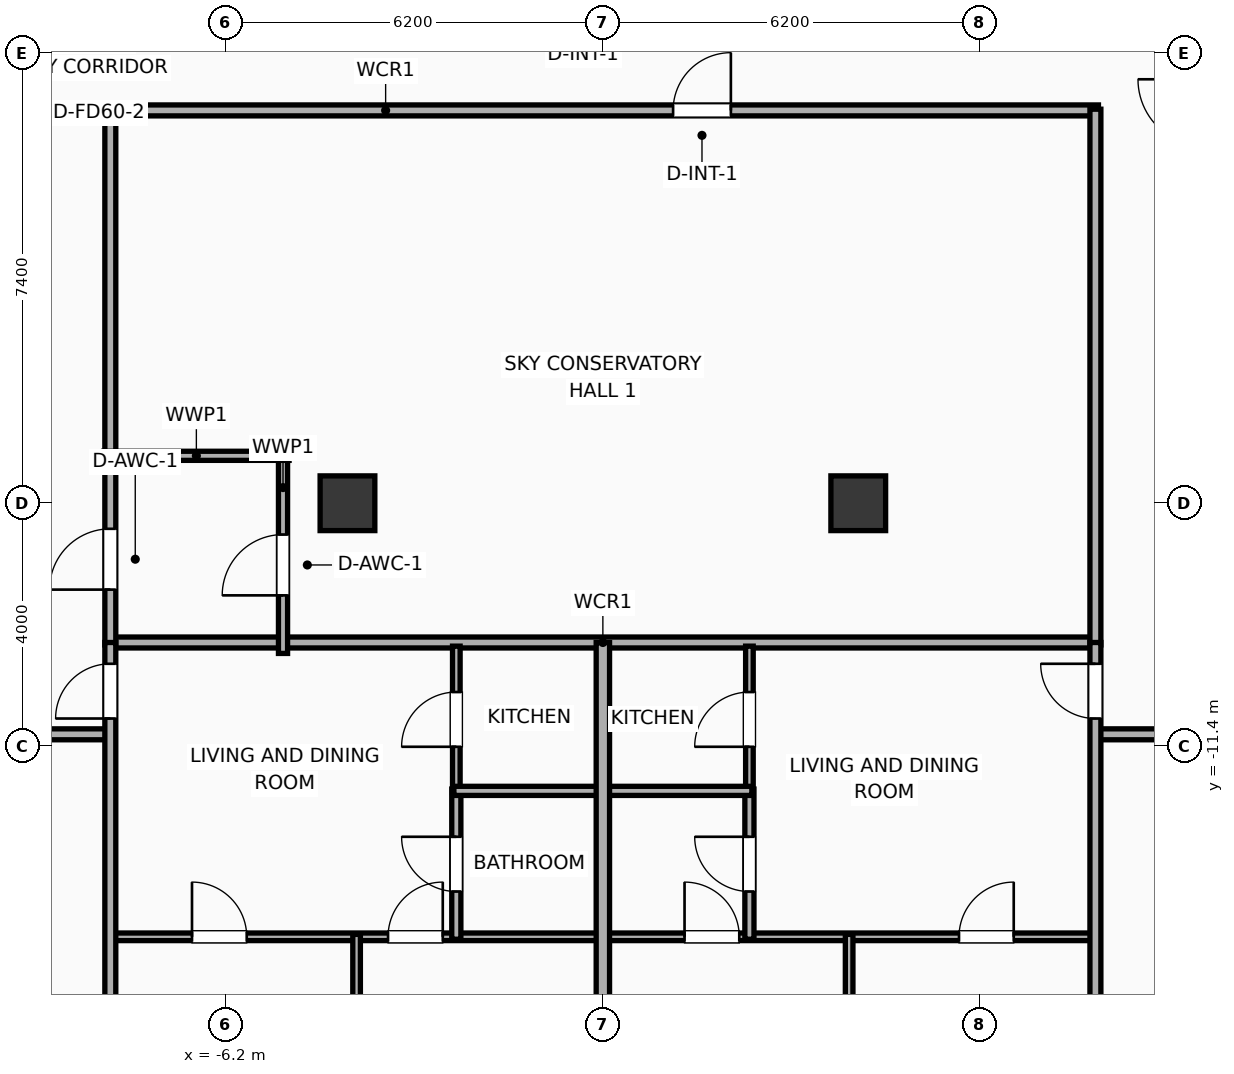
"""IFC4 building model, lengths in metres.
Left out: names, types, materials, properties, quantities, classifications, styles, units other than length and angle.
Written with IfcOpenShell. Run it as: python <this file> out.ifc"""

import sys

from ifc_helpers import new_model, si_unit, direction, frame, frame_2d, origin, origin_2d, place, context, subcontext, project, spatial, rectangle, extrude, element, fill, save


model = new_model("IFC4")
c1 = context("Model", 3, precision=1e-05, world=origin(), true_north=direction((0.0, 1.0)))
c2 = subcontext(c1, "Body", "Model", "MODEL_VIEW")
j1 = project(units=[si_unit("LENGTHUNIT", "METRE"), si_unit("PLANEANGLEUNIT", "RADIAN")], contexts=[c1])
p1 = place(None, origin())
s1 = spatial("IfcSite", under=j1, at=p1, CompositionType="ELEMENT")
p2 = place(p1, origin())
s2 = spatial("IfcBuilding", under=s1, at=p2, CompositionType="ELEMENT")
p3 = place(p2, frame((0.0, 0.0, 183.3)))
s3 = spatial("IfcBuildingStorey", under=s2, at=p3, CompositionType="ELEMENT", Elevation=183.3)
for number, where, z_axis, x_axis in (
    (1, (-4.2, -7.4, 0.0), (0.0, 0.0, 1.0), (1.0, 0.0, 0.0)),
    (2, (4.2, -7.4, 0.0), (0.0, 0.0, 1.0), (1.0, 0.0, 0.0)),
):
    element("IfcColumn", number, at=place(p3, frame(where, z_axis=z_axis, x_axis=x_axis)), inside=s3, PredefinedType="COLUMN", context=c2, shape_type="SweptSolid", body=[
        extrude(rectangle(XDim=0.9, YDim=0.9, at=origin_2d()), origin(), (0.0, 0.0, 1.0), 3.9),
    ])
p4 = place(p3, frame((-8.15, -9.69, 0.0), z_axis=(0.0, 0.0, 1.0), x_axis=(1.0, 0.0, 0.0)))
e3 = element("IfcWall", 3, at=p4, inside=s3, PredefinedType="PARTITIONING", context=c2, shape_type="SweptSolid", body=[
    extrude(rectangle(XDim=16.3, YDim=0.18, at=frame_2d((8.15, 0.0))), origin(), (0.0, 0.0, 1.0), 3.65),
])
p5 = place(p3, frame((-8.15, -0.94, 0.0), z_axis=(0.0, 0.0, 1.0), x_axis=(1.0, 0.0, 0.0)))
e4 = element("IfcWall", 4, at=p5, inside=s3, PredefinedType="PARTITIONING", context=c2, shape_type="SweptSolid", body=[
    extrude(rectangle(XDim=16.3, YDim=0.18, at=frame_2d((8.15, 0.0))), origin(), (0.0, 0.0, 1.0), 3.65),
])
p6 = place(p5, frame((9.305, 0.0, 0.0)))
e5 = element("IfcOpeningElement", 5, at=p6, cuts=e4, PredefinedType="OPENING", context=c2, shape_type="SweptSolid", body=[
    extrude(rectangle(XDim=0.95, YDim=2.05, at=frame_2d((0.475, 1.025))), frame((0.0, 0.1, 0.0), z_axis=(0.0, -1.0, 0.0), x_axis=(1.0, 0.0, 0.0)), (0.0, 0.0, 1.0), 0.2),
])
p7 = place(p3, frame((-8.1, -9.73, 0.0), z_axis=(0.0, 0.0, 1.0), x_axis=(0.0, 1.0, 0.0)))
e6 = element("IfcWall", 6, at=p7, inside=s3, PredefinedType="PARTITIONING", context=c2, shape_type="SweptSolid", body=[
    extrude(rectangle(XDim=8.81, YDim=0.18, at=frame_2d((4.405, 0.0))), origin(), (0.0, 0.0, 1.0), 3.65),
])
p8 = place(p7, frame((0.91, 0.0, 0.0)))
e7 = element("IfcOpeningElement", 7, at=p8, cuts=e6, PredefinedType="OPENING", context=c2, shape_type="SweptSolid", body=[
    extrude(rectangle(XDim=1.0, YDim=2.05, at=frame_2d((0.5, 1.025))), frame((0.0, 0.1, 0.0), z_axis=(0.0, -1.0, 0.0), x_axis=(1.0, 0.0, 0.0)), (0.0, 0.0, 1.0), 0.2),
])
p9 = place(p3, frame((8.1, -9.73, 0.0), z_axis=(0.0, 0.0, 1.0), x_axis=(0.0, 1.0, 0.0)))
e8 = element("IfcWall", 8, at=p9, inside=s3, PredefinedType="PARTITIONING", context=c2, shape_type="SweptSolid", body=[
    extrude(rectangle(XDim=8.81, YDim=0.18, at=frame_2d((4.405, 0.0))), origin(), (0.0, 0.0, 1.0), 3.65),
])
p10 = place(p3, frame((-5.26, -9.87, 0.0), z_axis=(0.0, 0.0, 1.0), x_axis=(0.0, 1.0, 0.0)))
e9 = element("IfcWall", 9, at=p10, inside=s3, PredefinedType="PLUMBINGWALL", context=c2, shape_type="SweptSolid", body=[
    extrude(rectangle(XDim=3.35, YDim=0.15, at=frame_2d((1.675, 0.0))), origin(), (0.0, 0.0, 1.0), 3.65),
])
p11 = place(p10, frame((0.955, 0.0, 0.0)))
e10 = element("IfcOpeningElement", 10, at=p11, cuts=e9, PredefinedType="OPENING", context=c2, shape_type="SweptSolid", body=[
    extrude(rectangle(XDim=1.0, YDim=2.05, at=frame_2d((0.5, 1.025))), frame((0.0, 0.085, 0.0), z_axis=(0.0, -1.0, 0.0), x_axis=(1.0, 0.0, 0.0)), (0.0, 0.0, 1.0), 0.17),
])
p12 = place(p3, frame((-8.21, -6.62, 0.0), z_axis=(0.0, 0.0, 1.0), x_axis=(1.0, 0.0, 0.0)))
e11 = element("IfcWall", 11, at=p12, inside=s3, PredefinedType="PLUMBINGWALL", context=c2, shape_type="SweptSolid", body=[
    extrude(rectangle(XDim=3.05, YDim=0.15, at=frame_2d((1.525, 0.0))), origin(), (0.0, 0.0, 1.0), 3.65),
])
p13 = place(p3, frame((-19.5, -11.2, 0.0), z_axis=(0.0, 0.0, 1.0), x_axis=(1.0, 0.0, 0.0)))
e12 = element("IfcWall", 12, at=p13, inside=s3, PredefinedType="PARTITIONING", context=c2, shape_type="SweptSolid", body=[
    extrude(rectangle(XDim=11.42, YDim=0.18, at=frame_2d((5.71, 0.0))), origin(), (0.0, 0.0, 1.0), 3.65),
])
p14 = place(p13, frame((2.623, 0.0, 0.0)))
e13 = element("IfcOpeningElement", 13, at=p14, cuts=e12, PredefinedType="OPENING", context=c2, shape_type="SweptSolid", body=[
    extrude(rectangle(XDim=0.9, YDim=2.05, at=frame_2d((0.45, 1.025))), frame((0.0, 0.1, 0.0), z_axis=(0.0, -1.0, 0.0), x_axis=(1.0, 0.0, 0.0)), (0.0, 0.0, 1.0), 0.2),
])
p15 = place(p13, frame((9.189, 0.0, 0.0)))
e14 = element("IfcOpeningElement", 14, at=p15, cuts=e12, PredefinedType="OPENING", context=c2, shape_type="SweptSolid", body=[
    extrude(rectangle(XDim=1.15, YDim=2.05, at=frame_2d((0.575, 1.025))), frame((0.0, 0.1, 0.0), z_axis=(0.0, -1.0, 0.0), x_axis=(1.0, 0.0, 0.0)), (0.0, 0.0, 1.0), 0.2),
])
p16 = place(p3, frame((8.08, -11.2, 0.0), z_axis=(0.0, 0.0, 1.0), x_axis=(1.0, 0.0, 0.0)))
e15 = element("IfcWall", 15, at=p16, inside=s3, PredefinedType="PARTITIONING", context=c2, shape_type="SweptSolid", body=[
    extrude(rectangle(XDim=11.42, YDim=0.18, at=frame_2d((5.71, 0.0))), origin(), (0.0, 0.0, 1.0), 3.65),
])
p17 = place(p16, frame((1.175, 0.0, 0.0)))
e16 = element("IfcOpeningElement", 16, at=p17, cuts=e15, PredefinedType="OPENING", context=c2, shape_type="SweptSolid", body=[
    extrude(rectangle(XDim=1.15, YDim=2.05, at=frame_2d((0.575, 1.025))), frame((0.0, 0.1, 0.0), z_axis=(0.0, -1.0, 0.0), x_axis=(1.0, 0.0, 0.0)), (0.0, 0.0, 1.0), 0.2),
])
p18 = place(p16, frame((6.87, 0.0, 0.0)))
e17 = element("IfcOpeningElement", 17, at=p18, cuts=e15, PredefinedType="OPENING", context=c2, shape_type="SweptSolid", body=[
    extrude(rectangle(XDim=1.15, YDim=2.05, at=frame_2d((0.575, 1.025))), frame((0.0, 0.1, 0.0), z_axis=(0.0, -1.0, 0.0), x_axis=(1.0, 0.0, 0.0)), (0.0, 0.0, 1.0), 0.2),
])
p19 = place(p3, frame((-8.08, -14.53, 0.0), z_axis=(0.0, 0.0, 1.0), x_axis=(1.0, 0.0, 0.0)))
e18 = element("IfcWall", 18, at=p19, inside=s3, PredefinedType="PARTITIONING", context=c2, shape_type="SweptSolid", body=[
    extrude(rectangle(XDim=8.06, YDim=0.125, at=frame_2d((4.03, 0.0))), origin(), (0.0, 0.0, 1.0), 3.65),
])
p20 = place(p19, frame((1.323, 0.0, 0.0)))
e19 = element("IfcOpeningElement", 19, at=p20, cuts=e18, PredefinedType="OPENING", context=c2, shape_type="SweptSolid", body=[
    extrude(rectangle(XDim=0.9, YDim=2.05, at=frame_2d((0.45, 1.025))), frame((0.0, 0.073, 0.0), z_axis=(0.0, -1.0, 0.0), x_axis=(1.0, 0.0, 0.0)), (0.0, 0.0, 1.0), 0.145),
])
p21 = place(p19, frame((4.547, 0.0, 0.0)))
e20 = element("IfcOpeningElement", 20, at=p21, cuts=e18, PredefinedType="OPENING", context=c2, shape_type="SweptSolid", body=[
    extrude(rectangle(XDim=0.9, YDim=2.05, at=frame_2d((0.45, 1.025))), frame((0.0, 0.073, 0.0), z_axis=(0.0, -1.0, 0.0), x_axis=(1.0, 0.0, 0.0)), (0.0, 0.0, 1.0), 0.145),
])
p22 = place(p3, frame((-2.41, -12.16, 0.0), z_axis=(0.0, 0.0, 1.0), x_axis=(0.0, 1.0, 0.0)))
e21 = element("IfcWall", 21, at=p22, inside=s3, PredefinedType="PARTITIONING", context=c2, shape_type="SweptSolid", body=[
    extrude(rectangle(XDim=2.41, YDim=0.125, at=frame_2d((1.205, 0.0))), origin(), (0.0, 0.0, 1.0), 3.65),
])
p23 = place(p22, frame((0.755, 0.0, 0.0)))
e22 = element("IfcOpeningElement", 22, at=p23, cuts=e21, PredefinedType="OPENING", context=c2, shape_type="SweptSolid", body=[
    extrude(rectangle(XDim=0.9, YDim=2.05, at=frame_2d((0.45, 1.025))), frame((0.0, 0.073, 0.0), z_axis=(0.0, -1.0, 0.0), x_axis=(1.0, 0.0, 0.0)), (0.0, 0.0, 1.0), 0.145),
])
p24 = place(p3, frame((-2.41, -14.57, 0.0), z_axis=(0.0, 0.0, 1.0), x_axis=(0.0, 1.0, 0.0)))
e23 = element("IfcWall", 23, at=p24, inside=s3, PredefinedType="PLUMBINGWALL", context=c2, shape_type="SweptSolid", body=[
    extrude(rectangle(XDim=2.47, YDim=0.15, at=frame_2d((1.235, 0.0))), origin(), (0.0, 0.0, 1.0), 3.65),
])
p25 = place(p24, frame((0.785, 0.0, 0.0)))
e24 = element("IfcOpeningElement", 24, at=p25, cuts=e23, PredefinedType="OPENING", context=c2, shape_type="SweptSolid", body=[
    extrude(rectangle(XDim=0.9, YDim=2.05, at=frame_2d((0.45, 1.025))), frame((0.0, 0.085, 0.0), z_axis=(0.0, -1.0, 0.0), x_axis=(1.0, 0.0, 0.0)), (0.0, 0.0, 1.0), 0.17),
])
p26 = place(p3, frame((-2.45, -12.13, 0.0), z_axis=(0.0, 0.0, 1.0), x_axis=(1.0, 0.0, 0.0)))
e25 = element("IfcWall", 25, at=p26, inside=s3, PredefinedType="PLUMBINGWALL", context=c2, shape_type="SweptSolid", body=[
    extrude(rectangle(XDim=2.43, YDim=0.15, at=frame_2d((1.215, 0.0))), origin(), (0.0, 0.0, 1.0), 3.65),
])
p27 = place(p3, frame((-4.05, -21.031, 0.0), z_axis=(0.0, 0.0, 1.0), x_axis=(0.0, 1.0, 0.0)))
e26 = element("IfcWall", 26, at=p27, inside=s3, PredefinedType="PARTITIONING", context=c2, shape_type="SweptSolid", body=[
    extrude(rectangle(XDim=6.541, YDim=0.125, at=frame_2d((3.271, 0.0))), origin(), (0.0, 0.0, 1.0), 3.65),
])
p28 = place(p3, frame((-8.1, -21.456, 0.0), z_axis=(0.0, 0.0, 1.0), x_axis=(0.0, 1.0, 0.0)))
e27 = element("IfcWall", 27, at=p28, inside=s3, PredefinedType="PARTITIONING", context=c2, shape_type="SweptSolid", body=[
    extrude(rectangle(XDim=11.766, YDim=0.18, at=frame_2d((5.883, 0.0))), origin(), (0.0, 0.0, 1.0), 3.65),
])
p29 = place(p28, frame((10.516, 0.0, 0.0)))
e28 = element("IfcOpeningElement", 28, at=p29, cuts=e27, PredefinedType="OPENING", context=c2, shape_type="SweptSolid", body=[
    extrude(rectangle(XDim=0.9, YDim=2.05, at=frame_2d((0.45, 1.025))), frame((0.0, 0.1, 0.0), z_axis=(0.0, -1.0, 0.0), x_axis=(1.0, 0.0, 0.0)), (0.0, 0.0, 1.0), 0.2),
])
p30 = place(p3, frame((0.02, -14.53, 0.0), z_axis=(0.0, 0.0, 1.0), x_axis=(1.0, 0.0, 0.0)))
e29 = element("IfcWall", 29, at=p30, inside=s3, PredefinedType="PARTITIONING", context=c2, shape_type="SweptSolid", body=[
    extrude(rectangle(XDim=8.06, YDim=0.125, at=frame_2d((4.03, 0.0))), origin(), (0.0, 0.0, 1.0), 3.65),
])
p31 = place(p30, frame((1.323, 0.0, 0.0)))
e30 = element("IfcOpeningElement", 30, at=p31, cuts=e29, PredefinedType="OPENING", context=c2, shape_type="SweptSolid", body=[
    extrude(rectangle(XDim=0.9, YDim=2.05, at=frame_2d((0.45, 1.025))), frame((0.0, 0.073, 0.0), z_axis=(0.0, -1.0, 0.0), x_axis=(1.0, 0.0, 0.0)), (0.0, 0.0, 1.0), 0.145),
])
p32 = place(p30, frame((5.837, 0.0, 0.0)))
e31 = element("IfcOpeningElement", 31, at=p32, cuts=e29, PredefinedType="OPENING", context=c2, shape_type="SweptSolid", body=[
    extrude(rectangle(XDim=0.9, YDim=2.05, at=frame_2d((0.45, 1.025))), frame((0.0, 0.073, 0.0), z_axis=(0.0, -1.0, 0.0), x_axis=(1.0, 0.0, 0.0)), (0.0, 0.0, 1.0), 0.145),
])
p33 = place(p3, frame((2.41, -12.16, 0.0), z_axis=(0.0, 0.0, 1.0), x_axis=(0.0, 1.0, 0.0)))
e32 = element("IfcWall", 32, at=p33, inside=s3, PredefinedType="PARTITIONING", context=c2, shape_type="SweptSolid", body=[
    extrude(rectangle(XDim=2.41, YDim=0.125, at=frame_2d((1.205, 0.0))), origin(), (0.0, 0.0, 1.0), 3.65),
])
p34 = place(p33, frame((0.755, 0.0, 0.0)))
e33 = element("IfcOpeningElement", 33, at=p34, cuts=e32, PredefinedType="OPENING", context=c2, shape_type="SweptSolid", body=[
    extrude(rectangle(XDim=0.9, YDim=2.05, at=frame_2d((0.45, 1.025))), frame((0.0, 0.073, 0.0), z_axis=(0.0, -1.0, 0.0), x_axis=(1.0, 0.0, 0.0)), (0.0, 0.0, 1.0), 0.145),
])
p35 = place(p3, frame((2.41, -14.57, 0.0), z_axis=(0.0, 0.0, 1.0), x_axis=(0.0, 1.0, 0.0)))
e34 = element("IfcWall", 34, at=p35, inside=s3, PredefinedType="PLUMBINGWALL", context=c2, shape_type="SweptSolid", body=[
    extrude(rectangle(XDim=2.47, YDim=0.15, at=frame_2d((1.235, 0.0))), origin(), (0.0, 0.0, 1.0), 3.65),
])
p36 = place(p35, frame((0.785, 0.0, 0.0)))
e35 = element("IfcOpeningElement", 35, at=p36, cuts=e34, PredefinedType="OPENING", context=c2, shape_type="SweptSolid", body=[
    extrude(rectangle(XDim=0.9, YDim=2.05, at=frame_2d((0.45, 1.025))), frame((0.0, 0.085, 0.0), z_axis=(0.0, -1.0, 0.0), x_axis=(1.0, 0.0, 0.0)), (0.0, 0.0, 1.0), 0.17),
])
p37 = place(p3, frame((0.02, -12.13, 0.0), z_axis=(0.0, 0.0, 1.0), x_axis=(1.0, 0.0, 0.0)))
e36 = element("IfcWall", 36, at=p37, inside=s3, PredefinedType="PLUMBINGWALL", context=c2, shape_type="SweptSolid", body=[
    extrude(rectangle(XDim=2.43, YDim=0.15, at=frame_2d((1.215, 0.0))), origin(), (0.0, 0.0, 1.0), 3.65),
])
p38 = place(p3, frame((4.05, -20.179, 0.0), z_axis=(0.0, 0.0, 1.0), x_axis=(0.0, 1.0, 0.0)))
e37 = element("IfcWall", 37, at=p38, inside=s3, PredefinedType="PARTITIONING", context=c2, shape_type="SweptSolid", body=[
    extrude(rectangle(XDim=5.689, YDim=0.125, at=frame_2d((2.845, 0.0))), origin(), (0.0, 0.0, 1.0), 3.04),
])
p39 = place(p3, frame((8.1, -19.754, 0.0), z_axis=(0.0, 0.0, 1.0), x_axis=(0.0, 1.0, 0.0)))
e38 = element("IfcWall", 38, at=p39, inside=s3, PredefinedType="PARTITIONING", context=c2, shape_type="SweptSolid", body=[
    extrude(rectangle(XDim=10.064, YDim=0.18, at=frame_2d((5.032, 0.0))), origin(), (0.0, 0.0, 1.0), 3.65),
])
p40 = place(p39, frame((8.814, 0.0, 0.0)))
e39 = element("IfcOpeningElement", 39, at=p40, cuts=e38, PredefinedType="OPENING", context=c2, shape_type="SweptSolid", body=[
    extrude(rectangle(XDim=0.9, YDim=2.05, at=frame_2d((0.45, 1.025))), frame((0.0, 0.1, 0.0), z_axis=(0.0, -1.0, 0.0), x_axis=(1.0, 0.0, 0.0)), (0.0, 0.0, 1.0), 0.2),
])
p41 = place(p3, frame((0.0, -20.605, 0.0), z_axis=(0.0, 0.0, 1.0), x_axis=(0.0, 1.0, 0.0)))
e40 = element("IfcWall", 40, at=p41, inside=s3, PredefinedType="PARTITIONING", context=c2, shape_type="SweptSolid", body=[
    extrude(rectangle(XDim=10.915, YDim=0.22, at=frame_2d((5.458, 0.0))), origin(), (0.0, 0.0, 1.0), 3.65),
])
p42 = place(p6, origin())
e41 = element("IfcDoor", 41, at=p42, inside=s3, OperationType="SINGLE_SWING_RIGHT", PredefinedType="DOOR", context=c2, shape_type="SweptSolid", body=[
    extrude(rectangle(XDim=0.95, YDim=2.05, at=frame_2d((0.475, 1.025))), frame((0.0, 0.025, 0.0), z_axis=(0.0, -1.0, 0.0), x_axis=(1.0, 0.0, 0.0)), (0.0, 0.0, 1.0), 0.05),
])
fill(e5, e41)
p43 = place(p8, origin())
e42 = element("IfcDoor", 42, at=p43, inside=s3, OperationType="SINGLE_SWING_LEFT", PredefinedType="DOOR", context=c2, shape_type="SweptSolid", body=[
    extrude(rectangle(XDim=1.0, YDim=2.05, at=frame_2d((0.5, 1.025))), frame((0.0, 0.025, 0.0), z_axis=(0.0, -1.0, 0.0), x_axis=(1.0, 0.0, 0.0)), (0.0, 0.0, 1.0), 0.05),
])
fill(e7, e42)
p44 = place(p11, origin())
e43 = element("IfcDoor", 43, at=p44, inside=s3, OperationType="SINGLE_SWING_LEFT", PredefinedType="DOOR", context=c2, shape_type="SweptSolid", body=[
    extrude(rectangle(XDim=1.0, YDim=2.05, at=frame_2d((0.5, 1.025))), frame((0.0, 0.025, 0.0), z_axis=(0.0, -1.0, 0.0), x_axis=(1.0, 0.0, 0.0)), (0.0, 0.0, 1.0), 0.05),
])
fill(e10, e43)
p45 = place(p20, origin())
e44 = element("IfcDoor", 44, at=p45, inside=s3, OperationType="SINGLE_SWING_LEFT", PredefinedType="DOOR", context=c2, shape_type="SweptSolid", body=[
    extrude(rectangle(XDim=0.9, YDim=2.05, at=frame_2d((0.45, 1.025))), frame((0.0, 0.025, 0.0), z_axis=(0.0, -1.0, 0.0), x_axis=(1.0, 0.0, 0.0)), (0.0, 0.0, 1.0), 0.05),
])
fill(e19, e44)
p46 = place(p21, origin())
e45 = element("IfcDoor", 45, at=p46, inside=s3, OperationType="SINGLE_SWING_RIGHT", PredefinedType="DOOR", context=c2, shape_type="SweptSolid", body=[
    extrude(rectangle(XDim=0.9, YDim=2.05, at=frame_2d((0.45, 1.025))), frame((0.0, 0.025, 0.0), z_axis=(0.0, -1.0, 0.0), x_axis=(1.0, 0.0, 0.0)), (0.0, 0.0, 1.0), 0.05),
])
fill(e20, e45)
p47 = place(p23, origin())
e46 = element("IfcDoor", 46, at=p47, inside=s3, OperationType="SINGLE_SWING_LEFT", PredefinedType="DOOR", context=c2, shape_type="SweptSolid", body=[
    extrude(rectangle(XDim=0.9, YDim=2.05, at=frame_2d((0.45, 1.025))), frame((0.0, 0.025, 0.0), z_axis=(0.0, -1.0, 0.0), x_axis=(1.0, 0.0, 0.0)), (0.0, 0.0, 1.0), 0.05),
])
fill(e22, e46)
p48 = place(p25, origin())
e47 = element("IfcDoor", 47, at=p48, inside=s3, OperationType="SINGLE_SWING_RIGHT", PredefinedType="DOOR", context=c2, shape_type="SweptSolid", body=[
    extrude(rectangle(XDim=0.9, YDim=2.05, at=frame_2d((0.45, 1.025))), frame((0.0, 0.025, 0.0), z_axis=(0.0, -1.0, 0.0), x_axis=(1.0, 0.0, 0.0)), (0.0, 0.0, 1.0), 0.05),
])
fill(e24, e47)
p49 = place(p29, origin())
e48 = element("IfcDoor", 48, at=p49, inside=s3, OperationType="SINGLE_SWING_LEFT", PredefinedType="DOOR", context=c2, shape_type="SweptSolid", body=[
    extrude(rectangle(XDim=0.9, YDim=2.05, at=frame_2d((0.45, 1.025))), frame((0.0, 0.025, 0.0), z_axis=(0.0, -1.0, 0.0), x_axis=(1.0, 0.0, 0.0)), (0.0, 0.0, 1.0), 0.05),
])
fill(e28, e48)
p50 = place(p31, origin())
e49 = element("IfcDoor", 49, at=p50, inside=s3, OperationType="SINGLE_SWING_LEFT", PredefinedType="DOOR", context=c2, shape_type="SweptSolid", body=[
    extrude(rectangle(XDim=0.9, YDim=2.05, at=frame_2d((0.45, 1.025))), frame((0.0, 0.025, 0.0), z_axis=(0.0, -1.0, 0.0), x_axis=(1.0, 0.0, 0.0)), (0.0, 0.0, 1.0), 0.05),
])
fill(e30, e49)
p51 = place(p32, origin())
e50 = element("IfcDoor", 50, at=p51, inside=s3, OperationType="SINGLE_SWING_RIGHT", PredefinedType="DOOR", context=c2, shape_type="SweptSolid", body=[
    extrude(rectangle(XDim=0.9, YDim=2.05, at=frame_2d((0.45, 1.025))), frame((0.0, 0.025, 0.0), z_axis=(0.0, -1.0, 0.0), x_axis=(1.0, 0.0, 0.0)), (0.0, 0.0, 1.0), 0.05),
])
fill(e31, e50)
p52 = place(p34, origin())
e51 = element("IfcDoor", 51, at=p52, inside=s3, OperationType="SINGLE_SWING_LEFT", PredefinedType="DOOR", context=c2, shape_type="SweptSolid", body=[
    extrude(rectangle(XDim=0.9, YDim=2.05, at=frame_2d((0.45, 1.025))), frame((0.0, 0.025, 0.0), z_axis=(0.0, -1.0, 0.0), x_axis=(1.0, 0.0, 0.0)), (0.0, 0.0, 1.0), 0.05),
])
fill(e33, e51)
p53 = place(p36, origin())
e52 = element("IfcDoor", 52, at=p53, inside=s3, OperationType="SINGLE_SWING_RIGHT", PredefinedType="DOOR", context=c2, shape_type="SweptSolid", body=[
    extrude(rectangle(XDim=0.9, YDim=2.05, at=frame_2d((0.45, 1.025))), frame((0.0, 0.025, 0.0), z_axis=(0.0, -1.0, 0.0), x_axis=(1.0, 0.0, 0.0)), (0.0, 0.0, 1.0), 0.05),
])
fill(e35, e52)
p54 = place(p40, origin())
e53 = element("IfcDoor", 53, at=p54, inside=s3, OperationType="SINGLE_SWING_RIGHT", PredefinedType="DOOR", context=c2, shape_type="SweptSolid", body=[
    extrude(rectangle(XDim=0.9, YDim=2.05, at=frame_2d((0.45, 1.025))), frame((0.0, 0.025, 0.0), z_axis=(0.0, -1.0, 0.0), x_axis=(1.0, 0.0, 0.0)), (0.0, 0.0, 1.0), 0.05),
])
fill(e39, e53)
save(model, sys.argv[1])
